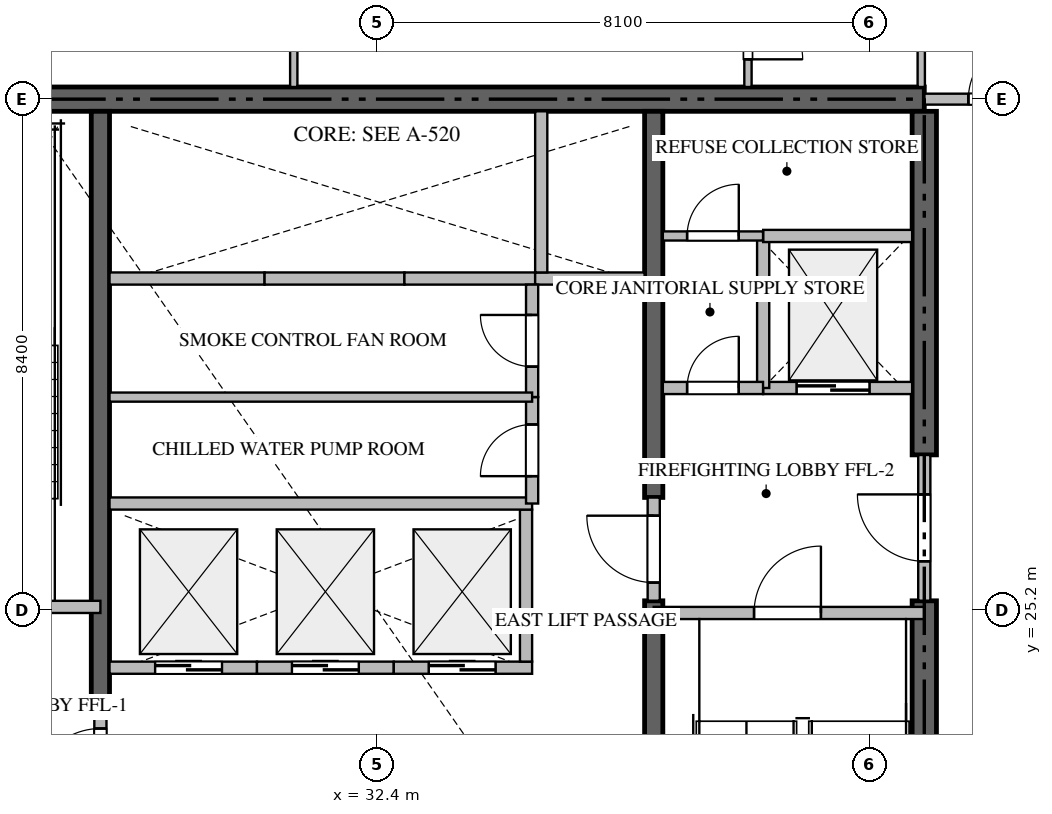
"""IFC4 building model, lengths in metres.
Left out: names, types, materials, properties, quantities, classifications, styles, units other than length and angle.
Written with IfcOpenShell. Run it as: python <this file> out.ifc"""

import sys

from ifc_helpers import new_model, si_unit, direction, frame, frame_2d, origin, place, context, subcontext, project, spatial, rectangle, extrude, source, transform, mapped, element, fill, save


model = new_model("IFC4")
c1 = context("Model", 3, precision=1e-05, world=origin(), true_north=direction((0.0, 1.0)))
c2 = subcontext(c1, "Body", "Model", "MODEL_VIEW")
j1 = project(units=[si_unit("LENGTHUNIT", "METRE"), si_unit("PLANEANGLEUNIT", "RADIAN")], contexts=[c1])
p1 = place(None, origin())
s1 = spatial("IfcSite", under=j1, at=p1, CompositionType="ELEMENT")
p2 = place(p1, origin())
s2 = spatial("IfcBuilding", under=s1, at=p2, CompositionType="ELEMENT")
p3 = place(p2, frame((0.0, 0.0, 172.65)))
s3 = spatial("IfcBuildingStorey", under=s2, at=p3, CompositionType="ELEMENT", Elevation=172.65)
p4 = place(p3, frame((41.4, 33.6, -0.26), z_axis=(0.0, 0.0, 1.0), x_axis=(-1.0, 0.0, 0.0)))
e1 = element("IfcWall", 1, at=p4, inside=s3, PredefinedType="SHEAR", context=c2, shape_type="SweptSolid", body=[
    extrude(rectangle(XDim=18.0, YDim=0.4, at=frame_2d((9.0, 0.0))), origin(), (0.0, 0.0, 1.0), 3.748),
])
p5 = place(p3, frame((41.4, 17.0, -0.26), z_axis=(0.0, 0.0, 1.0), x_axis=(0.0, 1.0, 0.0)))
e2 = element("IfcWall", 2, at=p5, inside=s3, PredefinedType="SHEAR", context=c2, shape_type="SweptSolid", body=[
    extrude(rectangle(XDim=8.35, YDim=0.4, at=frame_2d((4.175, 0.0))), origin(), (0.0, 0.0, 1.0), 3.748),
])
p6 = place(p3, frame((41.4, 27.75, -0.26), z_axis=(0.0, 0.0, 1.0), x_axis=(0.0, 1.0, 0.0)))
e3 = element("IfcWall", 3, at=p6, inside=s3, PredefinedType="SHEAR", context=c2, shape_type="SweptSolid", body=[
    extrude(rectangle(XDim=5.65, YDim=0.4, at=frame_2d((2.825, 0.0))), origin(), (0.0, 0.0, 1.0), 3.748),
])
p7 = place(p3, frame((27.85, 23.55, -0.26), z_axis=(0.0, 0.0, 1.0), x_axis=(0.0, 1.0, 0.0)))
e4 = element("IfcWall", 4, at=p7, inside=s3, PredefinedType="SHEAR", context=c2, shape_type="SweptSolid", body=[
    extrude(rectangle(XDim=9.85, YDim=0.3, at=frame_2d((4.925, 0.0))), origin(), (0.0, 0.0, 1.0), 3.748),
])
p8 = place(p3, frame((36.95, 17.0, -0.26), z_axis=(0.0, 0.0, 1.0), x_axis=(0.0, 1.0, 0.0)))
e5 = element("IfcWall", 5, at=p8, inside=s3, PredefinedType="SHEAR", context=c2, shape_type="SweptSolid", body=[
    extrude(rectangle(XDim=8.35, YDim=0.3, at=frame_2d((4.175, 0.0))), origin(), (0.0, 0.0, 1.0), 3.748),
])
p9 = place(p3, frame((36.95, 27.05, -0.26), z_axis=(0.0, 0.0, 1.0), x_axis=(0.0, 1.0, 0.0)))
e6 = element("IfcWall", 6, at=p9, inside=s3, PredefinedType="SHEAR", context=c2, shape_type="SweptSolid", body=[
    extrude(rectangle(XDim=6.35, YDim=0.3, at=frame_2d((3.175, 0.0))), origin(), (0.0, 0.0, 1.0), 3.748),
])
p10 = place(p3, frame((23.4, 25.25, 0.0), z_axis=(0.0, 0.0, 1.0), x_axis=(1.0, 0.0, 0.0)))
e7 = element("IfcWall", 7, at=p10, inside=s3, PredefinedType="STANDARD", context=c2, shape_type="SweptSolid", body=[
    extrude(rectangle(XDim=4.45, YDim=0.2, at=frame_2d((2.225, 0.0))), origin(), (0.0, 0.0, 1.0), 3.49),
])
p11 = place(p10, frame((1.65, 0.0, 0.0)))
e8 = element("IfcOpeningElement", 8, at=p11, cuts=e7, PredefinedType="OPENING", context=c2, shape_type="SweptSolid", body=[
    extrude(rectangle(XDim=1.1, YDim=2.15, at=frame_2d((0.55, 1.075))), frame((0.0, 0.11, 0.0), z_axis=(0.0, -1.0, 0.0), x_axis=(1.0, 0.0, 0.0)), (0.0, 0.0, 1.0), 0.22),
])
p12 = place(p3, frame((36.95, 25.15, 0.0), z_axis=(0.0, 0.0, 1.0), x_axis=(1.0, 0.0, 0.0)))
e9 = element("IfcWall", 9, at=p12, inside=s3, PredefinedType="STANDARD", context=c2, shape_type="SweptSolid", body=[
    extrude(rectangle(XDim=4.45, YDim=0.2, at=frame_2d((2.225, 0.0))), origin(), (0.0, 0.0, 1.0), 3.49),
])
p13 = place(p12, frame((1.65, 0.0, 0.0)))
e10 = element("IfcOpeningElement", 10, at=p13, cuts=e9, PredefinedType="OPENING", context=c2, shape_type="SweptSolid", body=[
    extrude(rectangle(XDim=1.1, YDim=2.15, at=frame_2d((0.55, 1.075))), frame((0.0, 0.11, 0.0), z_axis=(0.0, -1.0, 0.0), x_axis=(1.0, 0.0, 0.0)), (0.0, 0.0, 1.0), 0.22),
])
p14 = place(p3, frame((38.75, 28.85, 0.0), z_axis=(0.0, 0.0, 1.0), x_axis=(1.0, 0.0, 0.0)))
e11 = element("IfcWall", 11, at=p14, inside=s3, PredefinedType="STANDARD", context=c2, shape_type="SweptSolid", body=[
    extrude(rectangle(XDim=2.45, YDim=0.2, at=frame_2d((1.225, 0.0))), origin(), (0.0, 0.0, 1.0), 3.49),
])
p15 = place(p14, frame((0.55, 0.0, 0.0)))
e12 = element("IfcOpeningElement", 12, at=p15, cuts=e11, PredefinedType="OPENING", context=c2, shape_type="SweptSolid", body=[
    extrude(rectangle(XDim=1.2, YDim=2.2, at=frame_2d((0.6, 1.1))), frame((0.0, 0.11, 0.0), z_axis=(0.0, -1.0, 0.0), x_axis=(1.0, 0.0, 0.0)), (0.0, 0.0, 1.0), 0.22),
])
p16 = place(p3, frame((28.0, 24.25, 0.0), z_axis=(0.0, 0.0, 1.0), x_axis=(1.0, 0.0, 0.0)))
e13 = element("IfcWall", 13, at=p16, inside=s3, PredefinedType="STANDARD", context=c2, shape_type="SweptSolid", body=[
    extrude(rectangle(XDim=2.425, YDim=0.2, at=frame_2d((1.212, 0.0))), origin(), (0.0, 0.0, 1.0), 3.49),
])
p17 = place(p16, frame((0.75, 0.0, 0.0)))
e14 = element("IfcOpeningElement", 14, at=p17, cuts=e13, PredefinedType="OPENING", context=c2, shape_type="SweptSolid", body=[
    extrude(rectangle(XDim=1.1, YDim=2.2, at=frame_2d((0.55, 1.1))), frame((0.0, 0.11, 0.0), z_axis=(0.0, -1.0, 0.0), x_axis=(1.0, 0.0, 0.0)), (0.0, 0.0, 1.0), 0.22),
])
p18 = place(p3, frame((30.425, 24.25, 0.0), z_axis=(0.0, 0.0, 1.0), x_axis=(1.0, 0.0, 0.0)))
e15 = element("IfcWall", 15, at=p18, inside=s3, PredefinedType="STANDARD", context=c2, shape_type="SweptSolid", body=[
    extrude(rectangle(XDim=2.25, YDim=0.2, at=frame_2d((1.125, 0.0))), origin(), (0.0, 0.0, 1.0), 3.49),
])
p19 = place(p18, frame((0.575, 0.0, 0.0)))
e16 = element("IfcOpeningElement", 16, at=p19, cuts=e15, PredefinedType="OPENING", context=c2, shape_type="SweptSolid", body=[
    extrude(rectangle(XDim=1.1, YDim=2.2, at=frame_2d((0.55, 1.1))), frame((0.0, 0.11, 0.0), z_axis=(0.0, -1.0, 0.0), x_axis=(1.0, 0.0, 0.0)), (0.0, 0.0, 1.0), 0.22),
])
p20 = place(p3, frame((32.675, 24.25, 0.0), z_axis=(0.0, 0.0, 1.0), x_axis=(1.0, 0.0, 0.0)))
e17 = element("IfcWall", 17, at=p20, inside=s3, PredefinedType="STANDARD", context=c2, shape_type="SweptSolid", body=[
    extrude(rectangle(XDim=2.275, YDim=0.2, at=frame_2d((1.137, 0.0))), origin(), (0.0, 0.0, 1.0), 3.49),
])
p21 = place(p20, frame((0.575, 0.0, 0.0)))
e18 = element("IfcOpeningElement", 18, at=p21, cuts=e17, PredefinedType="OPENING", context=c2, shape_type="SweptSolid", body=[
    extrude(rectangle(XDim=1.1, YDim=2.2, at=frame_2d((0.55, 1.1))), frame((0.0, 0.11, 0.0), z_axis=(0.0, -1.0, 0.0), x_axis=(1.0, 0.0, 0.0)), (0.0, 0.0, 1.0), 0.22),
])
p22 = place(p3, frame((34.85, 24.35, 0.0), z_axis=(0.0, 0.0, 1.0), x_axis=(0.0, 1.0, 0.0)))
e19 = element("IfcWall", 19, at=p22, inside=s3, PredefinedType="STANDARD", context=c2, shape_type="SweptSolid", body=[
    extrude(rectangle(XDim=2.5, YDim=0.2, at=frame_2d((1.25, 0.0))), origin(), (0.0, 0.0, 1.0), 3.49),
])
p23 = place(p3, frame((28.0, 30.65, 0.0), z_axis=(0.0, 0.0, 1.0), x_axis=(1.0, 0.0, 0.0)))
e20 = element("IfcWall", 20, at=p23, inside=s3, PredefinedType="STANDARD", context=c2, shape_type="SweptSolid", body=[
    extrude(rectangle(XDim=2.55, YDim=0.2, at=frame_2d((1.275, 0.0))), origin(), (0.0, 0.0, 1.0), 3.49),
])
p24 = place(p3, frame((30.55, 30.65, 0.0), z_axis=(0.0, 0.0, 1.0), x_axis=(1.0, 0.0, 0.0)))
e21 = element("IfcWall", 21, at=p24, inside=s3, PredefinedType="STANDARD", context=c2, shape_type="SweptSolid", body=[
    extrude(rectangle(XDim=2.3, YDim=0.2, at=frame_2d((1.15, 0.0))), origin(), (0.0, 0.0, 1.0), 3.49),
])
p25 = place(p3, frame((32.85, 30.65, 0.0), z_axis=(0.0, 0.0, 1.0), x_axis=(1.0, 0.0, 0.0)))
e22 = element("IfcWall", 22, at=p25, inside=s3, PredefinedType="STANDARD", context=c2, shape_type="SweptSolid", body=[
    extrude(rectangle(XDim=2.15, YDim=0.2, at=frame_2d((1.075, 0.0))), origin(), (0.0, 0.0, 1.0), 3.49),
])
p26 = place(p3, frame((35.0, 30.65, 0.0), z_axis=(0.0, 0.0, 1.0), x_axis=(1.0, 0.0, 0.0)))
e23 = element("IfcWall", 23, at=p26, inside=s3, PredefinedType="STANDARD", context=c2, shape_type="SweptSolid", body=[
    extrude(rectangle(XDim=1.8, YDim=0.2, at=frame_2d((0.9, 0.0))), origin(), (0.0, 0.0, 1.0), 3.49),
])
p27 = place(p3, frame((35.1, 30.75, 0.0), z_axis=(0.0, 0.0, 1.0), x_axis=(0.0, 1.0, 0.0)))
e24 = element("IfcWall", 24, at=p27, inside=s3, PredefinedType="STANDARD", context=c2, shape_type="SweptSolid", body=[
    extrude(rectangle(XDim=2.65, YDim=0.2, at=frame_2d((1.325, 0.0))), origin(), (0.0, 0.0, 1.0), 3.49),
])
p28 = place(p3, frame((38.75, 28.85, 0.0), z_axis=(0.0, 0.0, 1.0), x_axis=(0.0, 1.0, 0.0)))
e25 = element("IfcWall", 25, at=p28, inside=s3, PredefinedType="STANDARD", context=c2, shape_type="SweptSolid", body=[
    extrude(rectangle(XDim=2.5, YDim=0.2, at=frame_2d((1.25, 0.0))), origin(), (0.0, 0.0, 1.0), 3.49),
])
p29 = place(p3, frame((38.75, 31.35, 0.0), z_axis=(0.0, 0.0, 1.0), x_axis=(1.0, 0.0, 0.0)))
e26 = element("IfcWall", 26, at=p29, inside=s3, PredefinedType="STANDARD", context=c2, shape_type="SweptSolid", body=[
    extrude(rectangle(XDim=2.45, YDim=0.2, at=frame_2d((1.225, 0.0))), origin(), (0.0, 0.0, 1.0), 3.49),
])
p30 = place(p3, frame((37.1, 28.85, 0.0), z_axis=(0.0, 0.0, 1.0), x_axis=(1.0, 0.0, 0.0)))
e27 = element("IfcWall", 27, at=p30, inside=s3, PredefinedType="STANDARD", context=c2, shape_type="SweptSolid", body=[
    extrude(rectangle(XDim=1.648, YDim=0.2, at=frame_2d((0.824, 0.0))), origin(), (0.0, 0.0, 1.0), 3.49),
])
p31 = place(p30, frame((0.399, 0.0, 0.0)))
e28 = element("IfcOpeningElement", 28, at=p31, cuts=e27, PredefinedType="OPENING", context=c2, shape_type="SweptSolid", body=[
    extrude(rectangle(XDim=0.85, YDim=2.1, at=frame_2d((0.425, 1.05))), frame((0.0, 0.11, 0.0), z_axis=(0.0, -1.0, 0.0), x_axis=(1.0, 0.0, 0.0)), (0.0, 0.0, 1.0), 0.22),
])
p32 = place(p3, frame((41.4, 25.352, 0.0), z_axis=(0.0, 0.0, 1.0), x_axis=(0.0, 1.0, 0.0)))
e29 = element("IfcWall", 29, at=p32, inside=s3, PredefinedType="STANDARD", context=c2, shape_type="SweptSolid", body=[
    extrude(rectangle(XDim=2.396, YDim=0.2, at=frame_2d((1.198, 0.0))), origin(), (0.0, 0.0, 1.0), 3.49),
])
p33 = place(p32, frame((0.648, 0.0, 0.0)))
e30 = element("IfcOpeningElement", 30, at=p33, cuts=e29, PredefinedType="OPENING", context=c2, shape_type="SweptSolid", body=[
    extrude(rectangle(XDim=1.1, YDim=2.15, at=frame_2d((0.55, 1.075))), frame((0.0, 0.11, 0.0), z_axis=(0.0, -1.0, 0.0), x_axis=(1.0, 0.0, 0.0)), (0.0, 0.0, 1.0), 0.22),
])
p34 = place(p3, frame((27.85, 21.852, 0.0), z_axis=(0.0, 0.0, 1.0), x_axis=(0.0, 1.0, 0.0)))
e31 = element("IfcWall", 31, at=p34, inside=s3, PredefinedType="STANDARD", context=c2, shape_type="SweptSolid", body=[
    extrude(rectangle(XDim=1.696, YDim=0.2, at=frame_2d((0.848, 0.0))), origin(), (0.0, 0.0, 1.0), 3.49),
])
p35 = place(p34, frame((0.298, 0.0, 0.0)))
e32 = element("IfcOpeningElement", 32, at=p35, cuts=e31, PredefinedType="OPENING", context=c2, shape_type="SweptSolid", body=[
    extrude(rectangle(XDim=1.1, YDim=2.15, at=frame_2d((0.55, 1.075))), frame((0.0, 0.11, 0.0), z_axis=(0.0, -1.0, 0.0), x_axis=(1.0, 0.0, 0.0)), (0.0, 0.0, 1.0), 0.22),
])
p36 = place(p3, frame((36.95, 25.352, 0.0), z_axis=(0.0, 0.0, 1.0), x_axis=(0.0, 1.0, 0.0)))
e33 = element("IfcWall", 33, at=p36, inside=s3, PredefinedType="STANDARD", context=c2, shape_type="SweptSolid", body=[
    extrude(rectangle(XDim=1.696, YDim=0.2, at=frame_2d((0.848, 0.0))), origin(), (0.0, 0.0, 1.0), 3.49),
])
p37 = place(p36, frame((0.298, 0.0, 0.0)))
e34 = element("IfcOpeningElement", 34, at=p37, cuts=e33, PredefinedType="OPENING", context=c2, shape_type="SweptSolid", body=[
    extrude(rectangle(XDim=1.1, YDim=2.15, at=frame_2d((0.55, 1.075))), frame((0.0, 0.11, 0.0), z_axis=(0.0, -1.0, 0.0), x_axis=(1.0, 0.0, 0.0)), (0.0, 0.0, 1.0), 0.22),
])
p38 = place(p3, frame((28.0, 26.95, 0.0), z_axis=(0.0, 0.0, 1.0), x_axis=(1.0, 0.0, 0.0)))
e35 = element("IfcWall", 35, at=p38, inside=s3, PredefinedType="STANDARD", context=c2, shape_type="SweptSolid", body=[
    extrude(rectangle(XDim=6.95, YDim=0.2, at=frame_2d((3.475, 0.0))), origin(), (0.0, 0.0, 1.0), 3.49),
])
p39 = place(p3, frame((37.1, 31.35, 0.0), z_axis=(0.0, 0.0, 1.0), x_axis=(1.0, 0.0, 0.0)))
e36 = element("IfcWall", 36, at=p39, inside=s3, PredefinedType="PARTITIONING", context=c2, shape_type="SweptSolid", body=[
    extrude(rectangle(XDim=1.648, YDim=0.15, at=frame_2d((0.824, 0.0))), origin(), (0.0, 0.0, 1.0), 3.49),
])
p40 = place(p39, frame((0.399, 0.0, 0.0)))
e37 = element("IfcOpeningElement", 37, at=p40, cuts=e36, PredefinedType="OPENING", context=c2, shape_type="SweptSolid", body=[
    extrude(rectangle(XDim=0.85, YDim=2.1, at=frame_2d((0.425, 1.05))), frame((0.0, 0.085, 0.0), z_axis=(0.0, -1.0, 0.0), x_axis=(1.0, 0.0, 0.0)), (0.0, 0.0, 1.0), 0.17),
])
p41 = place(p3, frame((34.95, 26.95, 0.0), z_axis=(0.0, 0.0, 1.0), x_axis=(0.0, 1.0, 0.0)))
e38 = element("IfcWall", 38, at=p41, inside=s3, PredefinedType="STANDARD", context=c2, shape_type="SweptSolid", body=[
    extrude(rectangle(XDim=1.75, YDim=0.2, at=frame_2d((0.875, 0.0))), origin(), (0.0, 0.0, 1.0), 3.49),
])
p42 = place(p41, frame((0.45, 0.0, 0.0)))
e39 = element("IfcOpeningElement", 39, at=p42, cuts=e38, PredefinedType="OPENING", context=c2, shape_type="SweptSolid", body=[
    extrude(rectangle(XDim=0.85, YDim=2.1, at=frame_2d((0.425, 1.05))), frame((0.0, 0.11, 0.0), z_axis=(0.0, -1.0, 0.0), x_axis=(1.0, 0.0, 0.0)), (0.0, 0.0, 1.0), 0.22),
])
p43 = place(p3, frame((34.95, 28.702, 0.0), z_axis=(0.0, 0.0, 1.0), x_axis=(0.0, 1.0, 0.0)))
e40 = element("IfcWall", 40, at=p43, inside=s3, PredefinedType="STANDARD", context=c2, shape_type="SweptSolid", body=[
    extrude(rectangle(XDim=1.848, YDim=0.2, at=frame_2d((0.924, 0.0))), origin(), (0.0, 0.0, 1.0), 3.49),
])
p44 = place(p43, frame((0.499, 0.0, 0.0)))
e41 = element("IfcOpeningElement", 41, at=p44, cuts=e40, PredefinedType="OPENING", context=c2, shape_type="SweptSolid", body=[
    extrude(rectangle(XDim=0.85, YDim=2.1, at=frame_2d((0.425, 1.05))), frame((0.0, 0.11, 0.0), z_axis=(0.0, -1.0, 0.0), x_axis=(1.0, 0.0, 0.0)), (0.0, 0.0, 1.0), 0.22),
])
p45 = place(p3, frame((28.0, 28.7, 0.0), z_axis=(0.0, 0.0, 1.0), x_axis=(1.0, 0.0, 0.0)))
e42 = element("IfcWall", 42, at=p45, inside=s3, PredefinedType="PARTITIONING", context=c2, shape_type="SweptSolid", body=[
    extrude(rectangle(XDim=6.95, YDim=0.15, at=frame_2d((3.475, 0.0))), origin(), (0.0, 0.0, 1.0), 3.49),
])
p46 = place(p3, frame((41.402, 33.6, 0.0), z_axis=(0.0, 0.0, 1.0), x_axis=(1.0, 0.0, 0.0)))
e43 = element("IfcWall", 43, at=p46, inside=s3, PredefinedType="PARTITIONING", context=c2, shape_type="SweptSolid", body=[
    extrude(rectangle(XDim=2.446, YDim=0.18, at=frame_2d((1.223, 0.0))), origin(), (0.0, 0.0, 1.0), 3.49),
])
p47 = place(p46, frame((0.723, 0.0, 0.0)))
e44 = element("IfcOpeningElement", 44, at=p47, cuts=e43, PredefinedType="OPENING", context=c2, shape_type="SweptSolid", body=[
    extrude(rectangle(XDim=1.0, YDim=2.15, at=frame_2d((0.5, 1.075))), frame((0.0, 0.1, 0.0), z_axis=(0.0, -1.0, 0.0), x_axis=(1.0, 0.0, 0.0)), (0.0, 0.0, 1.0), 0.2),
])
p48 = place(p3, frame((41.35, 36.35, 0.0), z_axis=(0.0, 0.0, 1.0), x_axis=(0.0, -1.0, 0.0)))
e45 = element("IfcWall", 45, at=p48, inside=s3, PredefinedType="PARTITIONING", context=c2, shape_type="SweptSolid", body=[
    extrude(rectangle(XDim=2.55, YDim=0.12, at=frame_2d((1.275, 0.0))), origin(), (0.0, 0.0, 1.0), 3.49),
])
p49 = place(p3, frame((38.5, 35.75, 0.0), z_axis=(0.0, 0.0, 1.0), x_axis=(0.0, -1.0, 0.0)))
e46 = element("IfcWall", 46, at=p49, inside=s3, PredefinedType="PARTITIONING", context=c2, shape_type="SweptSolid", body=[
    extrude(rectangle(XDim=1.95, YDim=0.12, at=frame_2d((0.975, 0.0))), origin(), (0.0, 0.0, 1.0), 3.49),
])
p50 = place(p49, frame((0.595, 0.0, 0.0)))
e47 = element("IfcOpeningElement", 47, at=p50, cuts=e46, PredefinedType="OPENING", context=c2, shape_type="SweptSolid", body=[
    extrude(rectangle(XDim=0.9, YDim=2.1, at=frame_2d((0.45, 1.05))), frame((0.0, 0.07, 0.0), z_axis=(0.0, -1.0, 0.0), x_axis=(1.0, 0.0, 0.0)), (0.0, 0.0, 1.0), 0.14),
])
p51 = place(p3, frame((31.03, 35.748, 0.0), z_axis=(0.0, 0.0, 1.0), x_axis=(0.0, -1.0, 0.0)))
e48 = element("IfcWall", 48, at=p51, inside=s3, PredefinedType="PARTITIONING", context=c2, shape_type="SweptSolid", body=[
    extrude(rectangle(XDim=1.948, YDim=0.12, at=frame_2d((0.974, 0.0))), origin(), (0.0, 0.0, 1.0), 3.49),
])
m1 = source(origin(), c2, "Body", "SweptSolid", [
    extrude(rectangle(XDim=1.1, YDim=2.15, at=frame_2d((0.55, 1.075))), frame((0.0, 0.025, 0.0), z_axis=(0.0, -1.0, 0.0), x_axis=(1.0, 0.0, 0.0)), (0.0, 0.0, 1.0), 0.05),
])
p52 = place(p13, origin())
e49 = element("IfcDoor", 49, at=p52, inside=s3, OperationType="SINGLE_SWING_RIGHT", PredefinedType="DOOR", context=c2, shape_type="MappedRepresentation", body=[
    mapped(m1, transform((0.0, 0.0, 0.0), scale=1.0)),
])
fill(e10, e49)
m2 = source(origin(), c2, "Body", "SweptSolid", [
    extrude(rectangle(XDim=1.2, YDim=2.2, at=frame_2d((0.6, 1.1))), frame((0.0, 0.025, 0.0), z_axis=(0.0, -1.0, 0.0), x_axis=(1.0, 0.0, 0.0)), (0.0, 0.0, 1.0), 0.05),
])
p53 = place(p15, origin())
e50 = element("IfcDoor", 50, at=p53, inside=s3, OperationType="DOUBLE_DOOR_SLIDING", PredefinedType="DOOR", context=c2, shape_type="MappedRepresentation", body=[
    mapped(m2, transform((0.0, 0.0, 0.0), scale=1.0)),
])
fill(e12, e50)
m3 = source(origin(), c2, "Body", "SweptSolid", [
    extrude(rectangle(XDim=1.1, YDim=2.2, at=frame_2d((0.55, 1.1))), frame((0.0, 0.025, 0.0), z_axis=(0.0, -1.0, 0.0), x_axis=(1.0, 0.0, 0.0)), (0.0, 0.0, 1.0), 0.05),
])
p54 = place(p17, origin())
e51 = element("IfcDoor", 51, at=p54, inside=s3, OperationType="DOUBLE_DOOR_SLIDING", PredefinedType="DOOR", context=c2, shape_type="MappedRepresentation", body=[
    mapped(m3, transform((0.0, 0.0, 0.0), scale=1.0)),
])
fill(e14, e51)
p55 = place(p19, origin())
e52 = element("IfcDoor", 52, at=p55, inside=s3, OperationType="DOUBLE_DOOR_SLIDING", PredefinedType="DOOR", context=c2, shape_type="MappedRepresentation", body=[
    mapped(m3, transform((0.0, 0.0, 0.0), scale=1.0)),
])
fill(e16, e52)
p56 = place(p21, origin())
e53 = element("IfcDoor", 53, at=p56, inside=s3, OperationType="DOUBLE_DOOR_SLIDING", PredefinedType="DOOR", context=c2, shape_type="MappedRepresentation", body=[
    mapped(m3, transform((0.0, 0.0, 0.0), scale=1.0)),
])
fill(e18, e53)
m4 = source(origin(), c2, "Body", "SweptSolid", [
    extrude(rectangle(XDim=0.85, YDim=2.1, at=frame_2d((0.425, 1.05))), frame((0.0, 0.025, 0.0), z_axis=(0.0, -1.0, 0.0), x_axis=(1.0, 0.0, 0.0)), (0.0, 0.0, 1.0), 0.05),
])
p57 = place(p31, origin())
e54 = element("IfcDoor", 54, at=p57, inside=s3, OperationType="SINGLE_SWING_RIGHT", PredefinedType="DOOR", context=c2, shape_type="MappedRepresentation", body=[
    mapped(m4, transform((0.0, 0.0, 0.0), scale=1.0)),
])
fill(e28, e54)
p58 = place(p33, origin())
e55 = element("IfcDoor", 55, at=p58, inside=s3, OperationType="SINGLE_SWING_RIGHT", PredefinedType="DOOR", context=c2, shape_type="MappedRepresentation", body=[
    mapped(m1, transform((0.0, 0.0, 0.0), scale=1.0)),
])
fill(e30, e55)
p59 = place(p35, origin())
e56 = element("IfcDoor", 56, at=p59, inside=s3, OperationType="SINGLE_SWING_LEFT", PredefinedType="DOOR", context=c2, shape_type="MappedRepresentation", body=[
    mapped(m1, transform((0.0, 0.0, 0.0), scale=1.0)),
])
fill(e32, e56)
p60 = place(p37, origin())
e57 = element("IfcDoor", 57, at=p60, inside=s3, OperationType="SINGLE_SWING_RIGHT", PredefinedType="DOOR", context=c2, shape_type="MappedRepresentation", body=[
    mapped(m1, transform((0.0, 0.0, 0.0), scale=1.0)),
])
fill(e34, e57)
p61 = place(p40, origin())
e58 = element("IfcDoor", 58, at=p61, inside=s3, OperationType="SINGLE_SWING_RIGHT", PredefinedType="DOOR", context=c2, shape_type="MappedRepresentation", body=[
    mapped(m4, transform((0.0, 0.0, 0.0), scale=1.0)),
])
fill(e37, e58)
p62 = place(p42, origin())
e59 = element("IfcDoor", 59, at=p62, inside=s3, OperationType="SINGLE_SWING_LEFT", PredefinedType="DOOR", context=c2, shape_type="MappedRepresentation", body=[
    mapped(m4, transform((0.0, 0.0, 0.0), scale=1.0)),
])
fill(e39, e59)
p63 = place(p44, origin())
e60 = element("IfcDoor", 60, at=p63, inside=s3, OperationType="SINGLE_SWING_RIGHT", PredefinedType="DOOR", context=c2, shape_type="MappedRepresentation", body=[
    mapped(m4, transform((0.0, 0.0, 0.0), scale=1.0)),
])
fill(e41, e60)
m5 = source(origin(), c2, "Body", "SweptSolid", [
    extrude(rectangle(XDim=1.0, YDim=2.15, at=frame_2d((0.5, 1.075))), frame((0.0, 0.025, 0.0), z_axis=(0.0, -1.0, 0.0), x_axis=(1.0, 0.0, 0.0)), (0.0, 0.0, 1.0), 0.05),
])
p64 = place(p47, origin())
e61 = element("IfcDoor", 61, at=p64, inside=s3, OperationType="SINGLE_SWING_RIGHT", PredefinedType="DOOR", context=c2, shape_type="MappedRepresentation", body=[
    mapped(m5, transform((0.0, 0.0, 0.0), scale=1.0)),
])
fill(e44, e61)
m6 = source(origin(), c2, "Body", "SweptSolid", [
    extrude(rectangle(XDim=0.9, YDim=2.1, at=frame_2d((0.45, 1.05))), frame((0.0, 0.025, 0.0), z_axis=(0.0, -1.0, 0.0), x_axis=(1.0, 0.0, 0.0)), (0.0, 0.0, 1.0), 0.05),
])
p65 = place(p50, origin())
e62 = element("IfcDoor", 62, at=p65, inside=s3, OperationType="SINGLE_SWING_RIGHT", PredefinedType="DOOR", context=c2, shape_type="MappedRepresentation", body=[
    mapped(m6, transform((0.0, 0.0, 0.0), scale=1.0)),
])
fill(e47, e62)
save(model, sys.argv[1])
